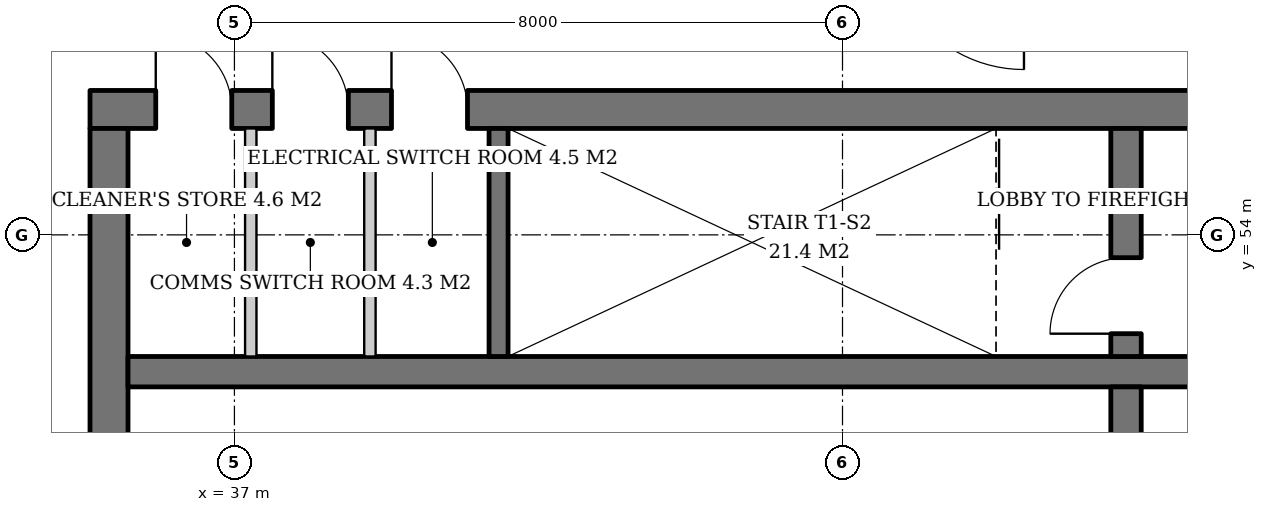
"""IFC4 building model, lengths in metres.
Left out: names, types, materials, properties, quantities, classifications, styles, units other than length and angle.
Written with IfcOpenShell. Run it as: python <this file> out.ifc"""

import sys

from ifc_helpers import new_model, si_unit, direction, frame, frame_2d, origin, origin_2d, place, context, subcontext, project, spatial, polyline, rectangle, outline, extrude, element, fill, save


model = new_model("IFC4")
c1 = context("Model", 3, precision=1e-05, world=origin(), true_north=direction((0.0, 1.0)))
c2 = subcontext(c1, "Body", "Model", "MODEL_VIEW")
j1 = project(units=[si_unit("LENGTHUNIT", "METRE"), si_unit("PLANEANGLEUNIT", "RADIAN")], contexts=[c1])
p1 = place(None, origin())
s1 = spatial("IfcSite", under=j1, at=p1, CompositionType="ELEMENT")
p2 = place(p1, origin())
s2 = spatial("IfcBuilding", under=s1, at=p2, CompositionType="ELEMENT")
p3 = place(p2, frame((0.0, 0.0, 290.8)))
s3 = spatial("IfcBuildingStorey", under=s2, at=p3, CompositionType="ELEMENT", Elevation=290.8)
p4 = place(p3, frame((33.722, 57.278, 0.019), z_axis=(0.016368491785, -0.016368491785, 0.999732036574), x_axis=(0.707106781187, 0.707106781187, 0.0)))
e1 = element("IfcColumn", 1, at=p4, inside=s3, PredefinedType="COLUMN", context=c2, shape_type="SweptSolid", body=[
    extrude(rectangle(XDim=1.6, YDim=1.6, at=origin_2d()), origin(), (0.0, 0.0, 1.0), 7.398),
])
p5 = place(p3, frame((35.1, 55.65, 0.0), z_axis=(0.0, 0.0, 1.0), x_axis=(1.0, 0.0, 0.0)))
e2 = element("IfcWall", 2, at=p5, inside=s3, PredefinedType="SHEAR", context=c2, shape_type="SweptSolid", body=[
    extrude(rectangle(XDim=19.8, YDim=0.5, at=frame_2d((9.9, 0.0))), origin(), (0.0, 0.0, 1.0), 7.238),
])
p6 = place(p5, frame((14.54, 0.0, 0.0)))
e3 = element("IfcOpeningElement", 3, at=p6, cuts=e2, PredefinedType="OPENING", context=c2, shape_type="SweptSolid", body=[
    extrude(rectangle(XDim=1.0, YDim=2.1, at=frame_2d((0.5, 1.05))), frame((0.0, 0.26, 0.0), z_axis=(0.0, -1.0, 0.0), x_axis=(1.0, 0.0, 0.0)), (0.0, 0.0, 1.0), 0.52),
])
p7 = place(p5, frame((0.865, 0.0, 0.0)))
e4 = element("IfcOpeningElement", 4, at=p7, cuts=e2, PredefinedType="OPENING", context=c2, shape_type="SweptSolid", body=[
    extrude(rectangle(XDim=1.0, YDim=2.1, at=frame_2d((0.5, 1.05))), frame((0.0, 0.26, 0.0), z_axis=(0.0, -1.0, 0.0), x_axis=(1.0, 0.0, 0.0)), (0.0, 0.0, 1.0), 0.52),
])
p8 = place(p5, frame((2.399, 0.0, 0.0)))
e5 = element("IfcOpeningElement", 5, at=p8, cuts=e2, PredefinedType="OPENING", context=c2, shape_type="SweptSolid", body=[
    extrude(rectangle(XDim=1.0, YDim=2.1, at=frame_2d((0.5, 1.05))), frame((0.0, 0.26, 0.0), z_axis=(0.0, -1.0, 0.0), x_axis=(1.0, 0.0, 0.0)), (0.0, 0.0, 1.0), 0.52),
])
p9 = place(p5, frame((3.966, 0.0, 0.0)))
e6 = element("IfcOpeningElement", 6, at=p9, cuts=e2, PredefinedType="OPENING", context=c2, shape_type="SweptSolid", body=[
    extrude(rectangle(XDim=1.0, YDim=2.1, at=frame_2d((0.5, 1.05))), frame((0.0, 0.26, 0.0), z_axis=(0.0, -1.0, 0.0), x_axis=(1.0, 0.0, 0.0)), (0.0, 0.0, 1.0), 0.52),
])
p10 = place(p3, frame((35.35, 36.6, 0.0), z_axis=(0.0, 0.0, 1.0), x_axis=(0.0, 1.0, 0.0)))
e7 = element("IfcWall", 7, at=p10, inside=s3, PredefinedType="SHEAR", context=c2, shape_type="SweptSolid", body=[
    extrude(outline(polyline([(0.0, 0.0), (18.8, 0.0), (18.8, 7.238), (0.0, 3.762), (0.0, 0.0)])), frame((0.0, 0.25, 0.0), z_axis=(0.0, -1.0, 0.0), x_axis=(1.0, 0.0, 0.0)), (0.0, 0.0, 1.0), 0.5),
])
p11 = place(p10, frame((8.5, 0.0, 0.0)))
e8 = element("IfcOpeningElement", 8, at=p11, cuts=e7, PredefinedType="OPENING", context=c2, shape_type="SweptSolid", body=[
    extrude(rectangle(XDim=1.8, YDim=2.4, at=frame_2d((0.9, 1.2))), frame((0.0, 0.26, 0.0), z_axis=(0.0, -1.0, 0.0), x_axis=(1.0, 0.0, 0.0)), (0.0, 0.0, 1.0), 0.52),
])
p12 = place(p3, frame((35.6, 52.2, 0.0), z_axis=(0.0, 0.0, 1.0), x_axis=(1.0, 0.0, 0.0)))
e9 = element("IfcWall", 9, at=p12, inside=s3, PredefinedType="SHEAR", context=c2, shape_type="SweptSolid", body=[
    extrude(rectangle(XDim=18.8, YDim=0.4, at=frame_2d((9.4, 0.0))), origin(), (0.0, 0.0, 1.0), 6.609),
])
p13 = place(p3, frame((48.73, 40.0, 0.0), z_axis=(0.0, 0.0, 1.0), x_axis=(0.0, 1.0, 0.0)))
e10 = element("IfcWall", 10, at=p13, inside=s3, PredefinedType="SHEAR", context=c2, shape_type="SweptSolid", body=[
    extrude(outline(polyline([(0.0, 0.0), (12.0, 0.0), (12.0, 6.609), (0.0, 4.391), (0.0, 0.0)])), frame((0.0, 0.2, 0.0), z_axis=(0.0, -1.0, 0.0), x_axis=(1.0, 0.0, 0.0)), (0.0, 0.0, 1.0), 0.4),
])
p14 = place(p3, frame((48.73, 52.4, 0.0), z_axis=(0.0, 0.0, 1.0), x_axis=(0.0, 1.0, 0.0)))
e11 = element("IfcWall", 11, at=p14, inside=s3, PredefinedType="SHEAR", context=c2, shape_type="SweptSolid", body=[
    extrude(outline(polyline([(0.0, 0.0), (3.0, 0.0), (3.0, 7.238), (0.0, 6.683), (0.0, 0.0)])), frame((0.0, 0.2, 0.0), z_axis=(0.0, -1.0, 0.0), x_axis=(1.0, 0.0, 0.0)), (0.0, 0.0, 1.0), 0.4),
])
p15 = place(p14, frame((0.3, 0.0, 0.0)))
e12 = element("IfcOpeningElement", 12, at=p15, cuts=e11, PredefinedType="OPENING", context=c2, shape_type="SweptSolid", body=[
    extrude(rectangle(XDim=1.0, YDim=2.1, at=frame_2d((0.5, 1.05))), frame((0.0, 0.21, 0.0), z_axis=(0.0, -1.0, 0.0), x_axis=(1.0, 0.0, 0.0)), (0.0, 0.0, 1.0), 0.42),
])
p16 = place(p3, frame((40.475, 52.4, 0.0), z_axis=(0.0, 0.0, 1.0), x_axis=(0.0, 1.0, 0.0)))
e13 = element("IfcWall", 13, at=p16, inside=s3, PredefinedType="SHEAR", context=c2, shape_type="SweptSolid", body=[
    extrude(outline(polyline([(0.0, 0.0), (3.0, 0.0), (3.0, 7.238), (0.0, 6.683), (0.0, 0.0)])), frame((0.0, 0.125, 0.0), z_axis=(0.0, -1.0, 0.0), x_axis=(1.0, 0.0, 0.0)), (0.0, 0.0, 1.0), 0.25),
])
for number, where, z_axis, x_axis in (
    (14, (37.215, 52.4, 0.0), (0.0, 0.0, 1.0), (0.0, 1.0, 0.0)),
    (15, (38.782, 52.4, 0.0), (0.0, 0.0, 1.0), (0.0, 1.0, 0.0)),
):
    element("IfcWall", number, at=place(p3, frame(where, z_axis=z_axis, x_axis=x_axis)), inside=s3, PredefinedType="SOLIDWALL", context=c2, shape_type="SweptSolid", body=[
        extrude(outline(polyline([(0.0, 0.0), (3.0, 0.0), (3.0, 7.238), (0.0, 6.683), (0.0, 0.0)])), frame((0.0, 0.075, 0.0), z_axis=(0.0, -1.0, 0.0), x_axis=(1.0, 0.0, 0.0)), (0.0, 0.0, 1.0), 0.15),
    ])
p17 = place(p15, origin())
e16 = element("IfcDoor", 16, at=p17, inside=s3, OperationType="SINGLE_SWING_LEFT", PredefinedType="DOOR", context=c2, shape_type="SweptSolid", body=[
    extrude(rectangle(XDim=1.0, YDim=2.1, at=frame_2d((0.5, 1.05))), frame((0.0, 0.025, 0.0), z_axis=(0.0, -1.0, 0.0), x_axis=(1.0, 0.0, 0.0)), (0.0, 0.0, 1.0), 0.05),
])
fill(e12, e16)
p18 = place(p7, origin())
e17 = element("IfcDoor", 17, at=p18, inside=s3, OperationType="SINGLE_SWING_LEFT", PredefinedType="DOOR", context=c2, shape_type="SweptSolid", body=[
    extrude(rectangle(XDim=1.0, YDim=2.1, at=frame_2d((0.5, 1.05))), frame((0.0, -0.19, 0.0), z_axis=(0.0, -1.0, 0.0), x_axis=(1.0, 0.0, 0.0)), (0.0, 0.0, 1.0), 0.05),
])
fill(e4, e17)
p19 = place(p8, origin())
e18 = element("IfcDoor", 18, at=p19, inside=s3, OperationType="SINGLE_SWING_LEFT", PredefinedType="DOOR", context=c2, shape_type="SweptSolid", body=[
    extrude(rectangle(XDim=1.0, YDim=2.1, at=frame_2d((0.5, 1.05))), frame((0.0, -0.19, 0.0), z_axis=(0.0, -1.0, 0.0), x_axis=(1.0, 0.0, 0.0)), (0.0, 0.0, 1.0), 0.05),
])
fill(e5, e18)
p20 = place(p9, origin())
e19 = element("IfcDoor", 19, at=p20, inside=s3, OperationType="SINGLE_SWING_LEFT", PredefinedType="DOOR", context=c2, shape_type="SweptSolid", body=[
    extrude(rectangle(XDim=1.0, YDim=2.1, at=frame_2d((0.5, 1.05))), frame((0.0, -0.19, 0.0), z_axis=(0.0, -1.0, 0.0), x_axis=(1.0, 0.0, 0.0)), (0.0, 0.0, 1.0), 0.05),
])
fill(e6, e19)
save(model, sys.argv[1])
